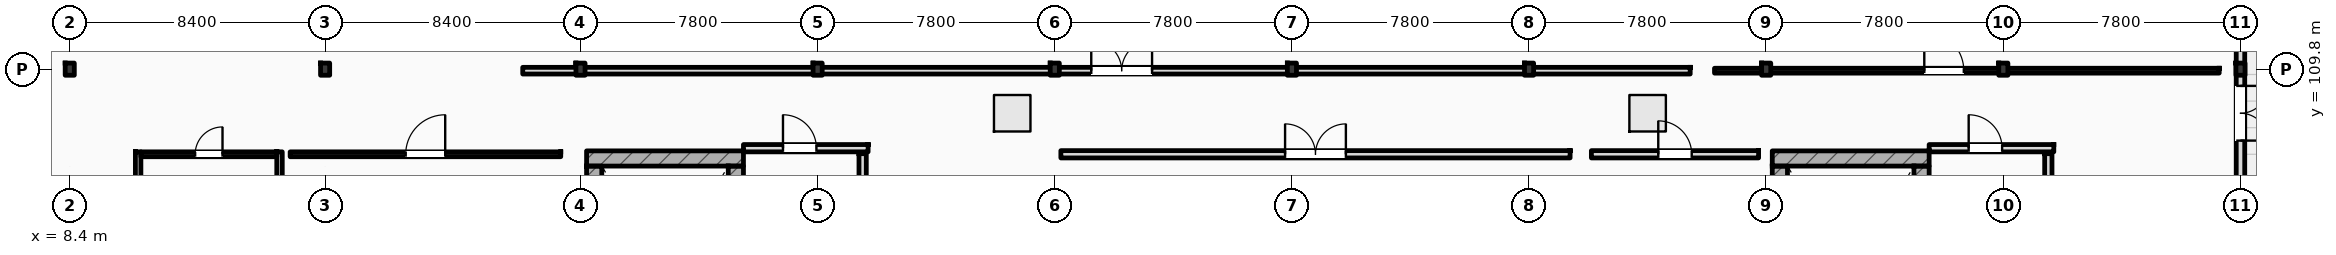
"""IFC4 building model, lengths in metres.
Left out: names, types, materials, properties, quantities, classifications, styles, units other than length and angle.
Written with IfcOpenShell. Run it as: python <this file> out.ifc"""

import sys

from ifc_helpers import new_model, si_unit, direction, frame, frame_2d, origin, origin_2d, place, context, subcontext, project, spatial, rectangle, i_section, extrude, element, fill, save


model = new_model("IFC4")
c1 = context("Model", 3, precision=1e-05, world=origin(), true_north=direction((0.0, 1.0)))
c2 = subcontext(c1, "Body", "Model", "MODEL_VIEW")
j1 = project(units=[si_unit("LENGTHUNIT", "METRE"), si_unit("PLANEANGLEUNIT", "RADIAN")], contexts=[c1])
p1 = place(None, origin())
s1 = spatial("IfcSite", under=j1, at=p1, CompositionType="ELEMENT")
p2 = place(p1, origin())
s2 = spatial("IfcBuilding", under=s1, at=p2, CompositionType="ELEMENT")
p3 = place(p2, frame((0.0, 0.0, 46.8)))
s3 = spatial("IfcBuildingStorey", under=s2, at=p3, CompositionType="ELEMENT", Elevation=46.8)
for number, where, z_axis, x_axis in (
    (1, (8.4, 109.8, 0.0), (0.0, 0.0, 1.0), (1.0, 0.0, 0.0)),
    (2, (16.8, 109.8, 0.0), (0.0, 0.0, 1.0), (1.0, 0.0, 0.0)),
    (3, (25.2, 109.8, 0.0), (0.0, 0.0, 1.0), (1.0, 0.0, 0.0)),
    (4, (33.0, 109.8, 0.0), (0.0, 0.0, 1.0), (1.0, 0.0, 0.0)),
    (5, (40.8, 109.8, 0.0), (0.0, 0.0, 1.0), (1.0, 0.0, 0.0)),
    (6, (48.6, 109.8, 0.0), (0.0, 0.0, 1.0), (1.0, 0.0, 0.0)),
    (7, (56.4, 109.8, 0.0), (0.0, 0.0, 1.0), (1.0, 0.0, 0.0)),
    (8, (64.2, 109.8, 0.0), (0.0, 0.0, 1.0), (1.0, 0.0, 0.0)),
    (9, (72.0, 109.8, 0.0), (0.0, 0.0, 1.0), (1.0, 0.0, 0.0)),
    (10, (79.8, 109.8, 0.0), (0.0, 0.0, 1.0), (1.0, 0.0, 0.0)),
):
    element("IfcColumn", number, at=place(p3, frame(where, z_axis=z_axis, x_axis=x_axis)), inside=s3, PredefinedType="COLUMN", context=c2, shape_type="SweptSolid", body=[
        extrude(i_section(OverallWidth=0.3, OverallDepth=0.4, WebThickness=0.013, FlangeThickness=0.024, FilletRadius=0.027, at=origin_2d()), origin(), (0.0, 0.0, 1.0), 4.8),
    ])
p4 = place(p3, frame((25.4, 106.862, 0.0), z_axis=(0.0, 0.0, 1.0), x_axis=(1.0, 0.0, 0.0)))
e11 = element("IfcWall", 11, at=p4, inside=s3, PredefinedType="SHEAR", context=c2, shape_type="SweptSolid", body=[
    extrude(rectangle(XDim=5.16, YDim=0.5, at=frame_2d((2.58, 0.0))), origin(), (0.0, 0.0, 1.0), 4.8),
])
p5 = place(p3, frame((25.65, 97.5, 0.0), z_axis=(0.0, 0.0, 1.0), x_axis=(0.0, 1.0, 0.0)))
e12 = element("IfcWall", 12, at=p5, inside=s3, PredefinedType="SHEAR", context=c2, shape_type="SweptSolid", body=[
    extrude(rectangle(XDim=9.112, YDim=0.5, at=frame_2d((4.556, 0.0))), origin(), (0.0, 0.0, 1.0), 4.8),
])
p6 = place(p3, frame((30.31, 97.5, 0.0), z_axis=(0.0, 0.0, 1.0), x_axis=(0.0, 1.0, 0.0)))
e13 = element("IfcWall", 13, at=p6, inside=s3, PredefinedType="SHEAR", context=c2, shape_type="SweptSolid", body=[
    extrude(rectangle(XDim=9.112, YDim=0.5, at=frame_2d((4.556, 0.0))), origin(), (0.0, 0.0, 1.0), 4.8),
])
p7 = place(p6, frame((0.44, 0.0, 0.0)))
e14 = element("IfcOpeningElement", 14, at=p7, cuts=e13, PredefinedType="OPENING", context=c2, shape_type="SweptSolid", body=[
    extrude(rectangle(XDim=1.1, YDim=2.2, at=frame_2d((0.55, 1.1))), frame((0.0, 0.26, 0.0), z_axis=(0.0, -1.0, 0.0), x_axis=(1.0, 0.0, 0.0)), (0.0, 0.0, 1.0), 0.52),
])
p8 = place(p3, frame((64.4, 106.862, 0.0), z_axis=(0.0, 0.0, 1.0), x_axis=(1.0, 0.0, 0.0)))
e15 = element("IfcWall", 15, at=p8, inside=s3, PredefinedType="SHEAR", context=c2, shape_type="SweptSolid", body=[
    extrude(rectangle(XDim=5.16, YDim=0.5, at=frame_2d((2.58, 0.0))), origin(), (0.0, 0.0, 1.0), 4.8),
])
p9 = place(p3, frame((64.65, 97.5, 0.0), z_axis=(0.0, 0.0, 1.0), x_axis=(0.0, 1.0, 0.0)))
e16 = element("IfcWall", 16, at=p9, inside=s3, PredefinedType="SHEAR", context=c2, shape_type="SweptSolid", body=[
    extrude(rectangle(XDim=9.112, YDim=0.5, at=frame_2d((4.556, 0.0))), origin(), (0.0, 0.0, 1.0), 4.8),
])
p10 = place(p3, frame((69.31, 97.5, 0.0), z_axis=(0.0, 0.0, 1.0), x_axis=(0.0, 1.0, 0.0)))
e17 = element("IfcWall", 17, at=p10, inside=s3, PredefinedType="SHEAR", context=c2, shape_type="SweptSolid", body=[
    extrude(rectangle(XDim=9.112, YDim=0.5, at=frame_2d((4.556, 0.0))), origin(), (0.0, 0.0, 1.0), 4.8),
])
p11 = place(p10, frame((0.44, 0.0, 0.0)))
e18 = element("IfcOpeningElement", 18, at=p11, cuts=e17, PredefinedType="OPENING", context=c2, shape_type="SweptSolid", body=[
    extrude(rectangle(XDim=1.1, YDim=2.2, at=frame_2d((0.55, 1.1))), frame((0.0, 0.26, 0.0), z_axis=(0.0, -1.0, 0.0), x_axis=(1.0, 0.0, 0.0)), (0.0, 0.0, 1.0), 0.52),
])
p12 = place(p3, frame((79.8, 96.0, 0.0), z_axis=(0.0, 0.0, 1.0), x_axis=(0.0, 1.0, 0.0)))
e19 = element("IfcWall", 19, at=p12, inside=s3, PredefinedType="STANDARD", context=c2, shape_type="SweptSolid", body=[
    extrude(rectangle(XDim=22.0, YDim=0.28, at=frame_2d((11.0, 0.0))), origin(), (0.0, 0.0, 1.0), 4.17),
])
p13 = place(p12, frame((11.45, 0.0, 0.0)))
e20 = element("IfcOpeningElement", 20, at=p13, cuts=e19, PredefinedType="OPENING", context=c2, shape_type="SweptSolid", body=[
    extrude(rectangle(XDim=1.8, YDim=2.4, at=frame_2d((0.9, 1.2))), frame((0.0, 0.15, 0.0), z_axis=(0.0, -1.0, 0.0), x_axis=(1.0, 0.0, 0.0)), (0.0, 0.0, 1.0), 0.3),
])
p14 = place(p3, frame((34.48, 98.78, 0.0), z_axis=(0.0, 0.0, 1.0), x_axis=(0.0, 1.0, 0.0)))
e21 = element("IfcWall", 21, at=p14, inside=s3, PredefinedType="STANDARD", context=c2, shape_type="SweptSolid", body=[
    extrude(rectangle(XDim=8.24, YDim=0.24, at=frame_2d((4.12, 0.0))), origin(), (0.0, 0.0, 1.0), 4.54),
])
p15 = place(p3, frame((30.56, 107.2, 0.0), z_axis=(0.0, 0.0, 1.0), x_axis=(1.0, 0.0, 0.0)))
e22 = element("IfcWall", 22, at=p15, inside=s3, PredefinedType="STANDARD", context=c2, shape_type="SweptSolid", body=[
    extrude(rectangle(XDim=4.1, YDim=0.24, at=frame_2d((2.05, 0.0))), origin(), (0.0, 0.0, 1.0), 4.54),
])
p16 = place(p15, frame((1.3, 0.0, 0.0)))
e23 = element("IfcOpeningElement", 23, at=p16, cuts=e22, PredefinedType="OPENING", context=c2, shape_type="SweptSolid", body=[
    extrude(rectangle(XDim=1.1, YDim=2.2, at=frame_2d((0.55, 1.1))), frame((0.0, 0.13, 0.0), z_axis=(0.0, -1.0, 0.0), x_axis=(1.0, 0.0, 0.0)), (0.0, 0.0, 1.0), 0.26),
])
p17 = place(p3, frame((73.48, 98.78, 0.0), z_axis=(0.0, 0.0, 1.0), x_axis=(0.0, 1.0, 0.0)))
e24 = element("IfcWall", 24, at=p17, inside=s3, PredefinedType="STANDARD", context=c2, shape_type="SweptSolid", body=[
    extrude(rectangle(XDim=8.24, YDim=0.24, at=frame_2d((4.12, 0.0))), origin(), (0.0, 0.0, 1.0), 4.54),
])
p18 = place(p3, frame((69.56, 107.2, 0.0), z_axis=(0.0, 0.0, 1.0), x_axis=(1.0, 0.0, 0.0)))
e25 = element("IfcWall", 25, at=p18, inside=s3, PredefinedType="STANDARD", context=c2, shape_type="SweptSolid", body=[
    extrude(rectangle(XDim=4.1, YDim=0.24, at=frame_2d((2.05, 0.0))), origin(), (0.0, 0.0, 1.0), 4.54),
])
p19 = place(p18, frame((1.3, 0.0, 0.0)))
e26 = element("IfcOpeningElement", 26, at=p19, cuts=e25, PredefinedType="OPENING", context=c2, shape_type="SweptSolid", body=[
    extrude(rectangle(XDim=1.1, YDim=2.2, at=frame_2d((0.55, 1.1))), frame((0.0, 0.13, 0.0), z_axis=(0.0, -1.0, 0.0), x_axis=(1.0, 0.0, 0.0)), (0.0, 0.0, 1.0), 0.26),
])
p20 = place(p3, frame((23.3, 109.75, 0.0), z_axis=(0.0, 0.0, 1.0), x_axis=(1.0, 0.0, 0.0)))
e27 = element("IfcWall", 27, at=p20, inside=s3, PredefinedType="PARTITIONING", context=c2, shape_type="SweptSolid", body=[
    extrude(rectangle(XDim=38.4, YDim=0.22, at=frame_2d((19.2, 0.0))), origin(), (0.0, 0.0, 1.0), 3.98),
])
p21 = place(p20, frame((18.7, 0.0, 0.0)))
e28 = element("IfcOpeningElement", 28, at=p21, cuts=e27, PredefinedType="OPENING", context=c2, shape_type="SweptSolid", body=[
    extrude(rectangle(XDim=2.0, YDim=2.35, at=frame_2d((1.0, 1.175))), frame((0.0, 0.12, 0.0), z_axis=(0.0, -1.0, 0.0), x_axis=(1.0, 0.0, 0.0)), (0.0, 0.0, 1.0), 0.24),
])
p22 = place(p3, frame((62.5, 109.75, 0.0), z_axis=(0.0, 0.0, 1.0), x_axis=(1.0, 0.0, 0.0)))
e29 = element("IfcWall", 29, at=p22, inside=s3, PredefinedType="PARTITIONING", context=c2, shape_type="SweptSolid", body=[
    extrude(rectangle(XDim=16.6, YDim=0.16, at=frame_2d((8.3, 0.0))), origin(), (0.0, 0.0, 1.0), 4.08),
])
p23 = place(p22, frame((6.9, 0.0, 0.0)))
e30 = element("IfcOpeningElement", 30, at=p23, cuts=e29, PredefinedType="OPENING", context=c2, shape_type="SweptSolid", body=[
    extrude(rectangle(XDim=1.3, YDim=2.2, at=frame_2d((0.65, 1.1))), frame((0.0, 0.09, 0.0), z_axis=(0.0, -1.0, 0.0), x_axis=(1.0, 0.0, 0.0)), (0.0, 0.0, 1.0), 0.18),
])
p24 = place(p3, frame((15.65, 107.0, 0.0), z_axis=(0.0, 0.0, 1.0), x_axis=(1.0, 0.0, 0.0)))
e31 = element("IfcWall", 31, at=p24, inside=s3, PredefinedType="PARTITIONING", context=c2, shape_type="SweptSolid", body=[
    extrude(rectangle(XDim=8.9, YDim=0.16, at=frame_2d((4.45, 0.0))), origin(), (0.0, 0.0, 1.0), 4.54),
])
p25 = place(p24, frame((3.8, 0.0, 0.0)))
e32 = element("IfcOpeningElement", 32, at=p25, cuts=e31, PredefinedType="OPENING", context=c2, shape_type="SweptSolid", body=[
    extrude(rectangle(XDim=1.3, YDim=2.2, at=frame_2d((0.65, 1.1))), frame((0.0, 0.09, 0.0), z_axis=(0.0, -1.0, 0.0), x_axis=(1.0, 0.0, 0.0)), (0.0, 0.0, 1.0), 0.18),
])
p26 = place(p3, frame((41.0, 107.0, 0.0), z_axis=(0.0, 0.0, 1.0), x_axis=(1.0, 0.0, 0.0)))
e33 = element("IfcWall", 33, at=p26, inside=s3, PredefinedType="STANDARD", context=c2, shape_type="SweptSolid", body=[
    extrude(rectangle(XDim=16.75, YDim=0.24, at=frame_2d((8.375, 0.0))), origin(), (0.0, 0.0, 1.0), 4.54),
])
p27 = place(p26, frame((7.375, 0.0, 0.0)))
e34 = element("IfcOpeningElement", 34, at=p27, cuts=e33, PredefinedType="OPENING", context=c2, shape_type="SweptSolid", body=[
    extrude(rectangle(XDim=2.0, YDim=2.35, at=frame_2d((1.0, 1.175))), frame((0.0, 0.13, 0.0), z_axis=(0.0, -1.0, 0.0), x_axis=(1.0, 0.0, 0.0)), (0.0, 0.0, 1.0), 0.26),
])
p28 = place(p3, frame((58.45, 107.0, 0.0), z_axis=(0.0, 0.0, 1.0), x_axis=(1.0, 0.0, 0.0)))
e35 = element("IfcWall", 35, at=p28, inside=s3, PredefinedType="STANDARD", context=c2, shape_type="SweptSolid", body=[
    extrude(rectangle(XDim=5.5, YDim=0.24, at=frame_2d((2.75, 0.0))), origin(), (0.0, 0.0, 1.0), 4.54),
])
p29 = place(p28, frame((2.2, 0.0, 0.0)))
e36 = element("IfcOpeningElement", 36, at=p29, cuts=e35, PredefinedType="OPENING", context=c2, shape_type="SweptSolid", body=[
    extrude(rectangle(XDim=1.1, YDim=2.2, at=frame_2d((0.55, 1.1))), frame((0.0, 0.13, 0.0), z_axis=(0.0, -1.0, 0.0), x_axis=(1.0, 0.0, 0.0)), (0.0, 0.0, 1.0), 0.26),
])
p30 = place(p3, frame((10.74, 107.0, 0.0), z_axis=(0.0, 0.0, 1.0), x_axis=(1.0, 0.0, 0.0)))
e37 = element("IfcWall", 37, at=p30, inside=s3, PredefinedType="PARTITIONING", context=c2, shape_type="SweptSolid", body=[
    extrude(rectangle(XDim=4.47, YDim=0.16, at=frame_2d((2.235, 0.0))), origin(), (0.0, 0.0, 1.0), 4.54),
])
p31 = place(p30, frame((1.785, 0.0, 0.0)))
e38 = element("IfcOpeningElement", 38, at=p31, cuts=e37, PredefinedType="OPENING", context=c2, shape_type="SweptSolid", body=[
    extrude(rectangle(XDim=0.9, YDim=2.1, at=frame_2d((0.45, 1.05))), frame((0.0, 0.09, 0.0), z_axis=(0.0, -1.0, 0.0), x_axis=(1.0, 0.0, 0.0)), (0.0, 0.0, 1.0), 0.18),
])
for number, where, z_axis, x_axis in (
    (39, (10.65, 96.09, 0.0), (0.0, 0.0, 1.0), (0.0, 1.0, 0.0)),
    (40, (15.3, 96.09, 0.0), (0.0, 0.0, 1.0), (0.0, 1.0, 0.0)),
):
    element("IfcWall", number, at=place(p3, frame(where, z_axis=z_axis, x_axis=x_axis)), inside=s3, PredefinedType="PARTITIONING", context=c2, shape_type="SweptSolid", body=[
        extrude(rectangle(XDim=10.99, YDim=0.18, at=frame_2d((5.495, 0.0))), origin(), (0.0, 0.0, 1.0), 4.54),
    ])
p32 = place(p13, frame((1.8, 0.0, 0.0), z_axis=(0.0, 0.0, 1.0), x_axis=(-1.0, 0.0, 0.0)))
e41 = element("IfcDoor", 41, at=p32, inside=s3, OperationType="DOUBLE_SWING_LEFT", PredefinedType="DOOR", context=c2, shape_type="SweptSolid", body=[
    extrude(rectangle(XDim=1.8, YDim=2.4, at=frame_2d((0.9, 1.2))), frame((0.0, 0.025, 0.0), z_axis=(0.0, -1.0, 0.0), x_axis=(1.0, 0.0, 0.0)), (0.0, 0.0, 1.0), 0.05),
])
fill(e20, e41)
p33 = place(p2, frame((0.0, 0.0, 51.6)))
p34 = place(p33, frame((0.0, 0.0, -0.26)))
p35 = place(p34, frame((39.4, 108.35, -0.01)))
p36 = place(p35, frame((0.0, 0.0, 0.22)))
e42 = element("IfcWindow", 42, at=p36, inside=s3, PartitioningType="SINGLE_PANEL", PredefinedType="SKYLIGHT", context=c2, shape_type="SweptSolid", body=[
    extrude(rectangle(XDim=1.2, YDim=1.2, at=origin_2d()), origin(), (0.0, 0.0, 1.0), 0.05),
])
p37 = place(p34, frame((60.3, 108.35, -0.01)))
p38 = place(p37, frame((0.0, 0.0, 0.22)))
e43 = element("IfcWindow", 43, at=p38, inside=s3, PartitioningType="SINGLE_PANEL", PredefinedType="SKYLIGHT", context=c2, shape_type="SweptSolid", body=[
    extrude(rectangle(XDim=1.2, YDim=1.2, at=origin_2d()), origin(), (0.0, 0.0, 1.0), 0.05),
])
p39 = place(p16, origin())
e44 = element("IfcDoor", 44, at=p39, inside=s3, OperationType="SINGLE_SWING_LEFT", PredefinedType="DOOR", context=c2, shape_type="SweptSolid", body=[
    extrude(rectangle(XDim=1.1, YDim=2.2, at=frame_2d((0.55, 1.1))), frame((0.0, 0.025, 0.0), z_axis=(0.0, -1.0, 0.0), x_axis=(1.0, 0.0, 0.0)), (0.0, 0.0, 1.0), 0.05),
])
fill(e23, e44)
p40 = place(p19, origin())
e45 = element("IfcDoor", 45, at=p40, inside=s3, OperationType="SINGLE_SWING_LEFT", PredefinedType="DOOR", context=c2, shape_type="SweptSolid", body=[
    extrude(rectangle(XDim=1.1, YDim=2.2, at=frame_2d((0.55, 1.1))), frame((0.0, 0.025, 0.0), z_axis=(0.0, -1.0, 0.0), x_axis=(1.0, 0.0, 0.0)), (0.0, 0.0, 1.0), 0.05),
])
fill(e26, e45)
p41 = place(p21, origin())
e46 = element("IfcDoor", 46, at=p41, inside=s3, OperationType="DOUBLE_SWING_LEFT", PredefinedType="DOOR", context=c2, shape_type="SweptSolid", body=[
    extrude(rectangle(XDim=2.0, YDim=2.35, at=frame_2d((1.0, 1.175))), frame((0.0, 0.025, 0.0), z_axis=(0.0, -1.0, 0.0), x_axis=(1.0, 0.0, 0.0)), (0.0, 0.0, 1.0), 0.05),
])
fill(e28, e46)
p42 = place(p23, origin())
e47 = element("IfcDoor", 47, at=p42, inside=s3, OperationType="SINGLE_SWING_LEFT", PredefinedType="DOOR", context=c2, shape_type="SweptSolid", body=[
    extrude(rectangle(XDim=1.3, YDim=2.2, at=frame_2d((0.65, 1.1))), frame((0.0, 0.025, 0.0), z_axis=(0.0, -1.0, 0.0), x_axis=(1.0, 0.0, 0.0)), (0.0, 0.0, 1.0), 0.05),
])
fill(e30, e47)
p43 = place(p25, origin())
e48 = element("IfcDoor", 48, at=p43, inside=s3, OperationType="SINGLE_SWING_RIGHT", PredefinedType="DOOR", context=c2, shape_type="SweptSolid", body=[
    extrude(rectangle(XDim=1.3, YDim=2.2, at=frame_2d((0.65, 1.1))), frame((0.0, 0.025, 0.0), z_axis=(0.0, -1.0, 0.0), x_axis=(1.0, 0.0, 0.0)), (0.0, 0.0, 1.0), 0.05),
])
fill(e32, e48)
p44 = place(p27, origin())
e49 = element("IfcDoor", 49, at=p44, inside=s3, OperationType="DOUBLE_SWING_LEFT", PredefinedType="DOOR", context=c2, shape_type="SweptSolid", body=[
    extrude(rectangle(XDim=2.0, YDim=2.35, at=frame_2d((1.0, 1.175))), frame((0.0, 0.025, 0.0), z_axis=(0.0, -1.0, 0.0), x_axis=(1.0, 0.0, 0.0)), (0.0, 0.0, 1.0), 0.05),
])
fill(e34, e49)
p45 = place(p29, origin())
e50 = element("IfcDoor", 50, at=p45, inside=s3, OperationType="SINGLE_SWING_LEFT", PredefinedType="DOOR", context=c2, shape_type="SweptSolid", body=[
    extrude(rectangle(XDim=1.1, YDim=2.2, at=frame_2d((0.55, 1.1))), frame((0.0, 0.025, 0.0), z_axis=(0.0, -1.0, 0.0), x_axis=(1.0, 0.0, 0.0)), (0.0, 0.0, 1.0), 0.05),
])
fill(e36, e50)
p46 = place(p31, origin())
e51 = element("IfcDoor", 51, at=p46, inside=s3, OperationType="SINGLE_SWING_RIGHT", PredefinedType="DOOR", context=c2, shape_type="SweptSolid", body=[
    extrude(rectangle(XDim=0.9, YDim=2.1, at=frame_2d((0.45, 1.05))), frame((0.0, 0.025, 0.0), z_axis=(0.0, -1.0, 0.0), x_axis=(1.0, 0.0, 0.0)), (0.0, 0.0, 1.0), 0.05),
])
fill(e38, e51)
save(model, sys.argv[1])
